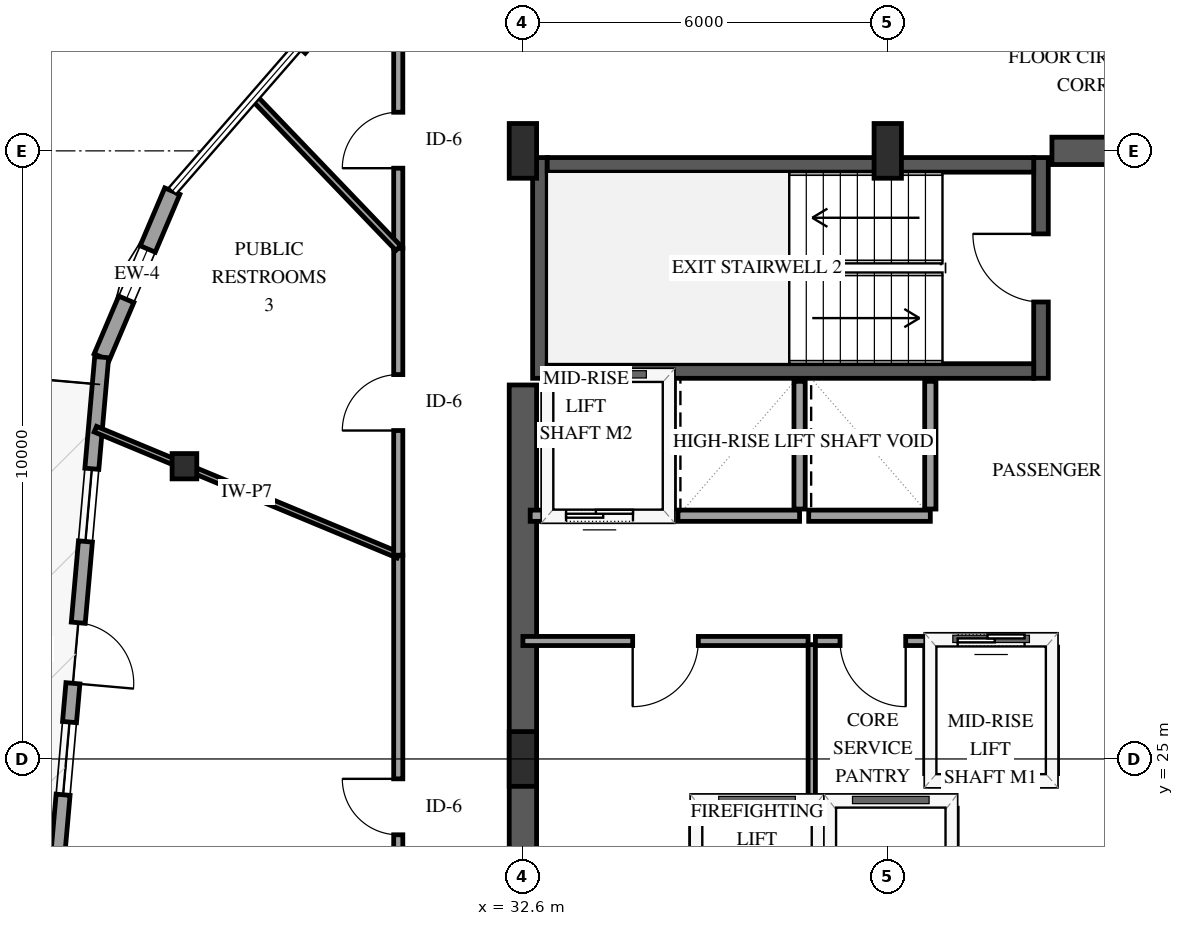
"""IFC4 building model, lengths in metres.
Left out: names, types, materials, properties, quantities, classifications, styles, units other than length and angle.
Written with IfcOpenShell. Run it as: python <this file> out.ifc"""

import sys

from ifc_helpers import new_model, si_unit, direction, frame, frame_2d, origin, origin_2d, place, context, subcontext, project, spatial, rectangle, i_section, extrude, element, fill, save


model = new_model("IFC4")
c1 = context("Model", 3, precision=1e-05, world=origin(), true_north=direction((0.0, 1.0)))
c2 = subcontext(c1, "Body", "Model", "MODEL_VIEW")
j1 = project(units=[si_unit("LENGTHUNIT", "METRE"), si_unit("PLANEANGLEUNIT", "RADIAN")], contexts=[c1])
p1 = place(None, origin())
s1 = spatial("IfcSite", under=j1, at=p1, CompositionType="ELEMENT")
p2 = place(p1, origin())
s2 = spatial("IfcBuilding", under=s1, at=p2, CompositionType="ELEMENT")
p3 = place(p2, frame((0.0, 0.0, 212.2)))
s3 = spatial("IfcBuildingStorey", under=s2, at=p3, CompositionType="ELEMENT", Elevation=212.2)
p4 = place(p3, frame((32.88, 31.26, 0.0), z_axis=(0.0, 0.0, 1.0), x_axis=(0.0, 1.0, 0.0)))
e1 = element("IfcWall", 1, at=p4, inside=s3, PredefinedType="SHEAR", context=c2, shape_type="SweptSolid", body=[
    extrude(rectangle(XDim=3.63, YDim=0.24, at=frame_2d((1.815, 0.0))), origin(), (0.0, 0.0, 1.0), 3.6),
])
p5 = place(p3, frame((41.12, 31.26, 0.0), z_axis=(0.0, 0.0, 1.0), x_axis=(0.0, 1.0, 0.0)))
e2 = element("IfcWall", 2, at=p5, inside=s3, PredefinedType="SHEAR", context=c2, shape_type="SweptSolid", body=[
    extrude(rectangle(XDim=3.63, YDim=0.24, at=frame_2d((1.815, 0.0))), origin(), (0.0, 0.0, 1.0), 3.6),
])
p6 = place(p5, frame((1.255, 0.0, 0.0)))
e3 = element("IfcOpeningElement", 3, at=p6, cuts=e2, PredefinedType="OPENING", context=c2, shape_type="SweptSolid", body=[
    extrude(rectangle(XDim=1.12, YDim=2.15, at=frame_2d((0.56, 1.075))), frame((0.0, 0.13, 0.0), z_axis=(0.0, -1.0, 0.0), x_axis=(1.0, 0.0, 0.0)), (0.0, 0.0, 1.0), 0.26),
])
for number, where, z_axis, x_axis in (
    (4, (33.0, 31.38, 0.0), (0.0, 0.0, 1.0), (1.0, 0.0, 0.0)),
    (5, (33.0, 34.77, 0.0), (0.0, 0.0, 1.0), (1.0, 0.0, 0.0)),
):
    element("IfcWall", number, at=place(p3, frame(where, z_axis=z_axis, x_axis=x_axis)), inside=s3, PredefinedType="SHEAR", context=c2, shape_type="SweptSolid", body=[
        extrude(rectangle(XDim=8.0, YDim=0.24, at=frame_2d((4.0, 0.0))), origin(), (0.0, 0.0, 1.0), 3.6),
    ])
p7 = place(p3, frame((32.6, 18.85, 0.0), z_axis=(0.0, 0.0, 1.0), x_axis=(0.0, 1.0, 0.0)))
e6 = element("IfcWall", 6, at=p7, inside=s3, PredefinedType="SHEAR", context=c2, shape_type="SweptSolid", body=[
    extrude(rectangle(XDim=12.3, YDim=0.45, at=frame_2d((6.15, 0.0))), origin(), (0.0, 0.0, 1.0), 3.6),
])
p8 = place(p3, frame((41.3, 35.0, 0.0), z_axis=(0.0, 0.0, 1.0), x_axis=(1.0, 0.0, 0.0)))
e7 = element("IfcWall", 7, at=p8, inside=s3, PredefinedType="SHEAR", context=c2, shape_type="SweptSolid", body=[
    extrude(rectangle(XDim=2.85, YDim=0.45, at=frame_2d((1.425, 0.0))), origin(), (0.0, 0.0, 1.0), 3.6),
])
for number, where, z_axis, x_axis in (
    (8, (32.6, 25.0, 0.0), (0.0, 0.0, 1.0), (1.0, 0.0, 0.0)),
    (9, (32.6, 35.0, 0.0), (0.0, 0.0, 1.0), (1.0, 0.0, 0.0)),
    (10, (38.6, 35.0, 0.0), (0.0, 0.0, 1.0), (1.0, 0.0, 0.0)),
):
    element("IfcColumn", number, at=place(p3, frame(where, z_axis=z_axis, x_axis=x_axis)), inside=s3, PredefinedType="PILASTER", context=c2, shape_type="SweptSolid", body=[
        extrude(rectangle(XDim=0.45, YDim=0.9, at=origin_2d()), origin(), (0.0, 0.0, 1.0), 3.6),
    ])
p9 = place(p3, frame((27.034, 29.814, 0.0), z_axis=(0.0, 0.0, 1.0), x_axis=(1.0, 0.0, 0.0)))
e11 = element("IfcColumn", 11, at=p9, inside=s3, PredefinedType="COLUMN", context=c2, shape_type="SweptSolid", body=[
    extrude(i_section(OverallWidth=0.406, OverallDepth=0.416, WebThickness=0.03, FlangeThickness=0.048, FilletRadius=0.038, at=origin_2d()), origin(), (0.0, 0.0, 1.0), 3.6),
])
p10 = place(p3, frame((26.834, 34.338, 0.0), z_axis=(0.0, 0.0, 1.0), x_axis=(-0.391325355633, -0.920252392574, 0.0)))
e12 = element("IfcWall", 12, at=p10, inside=s3, PredefinedType="SOLIDWALL", context=c2, shape_type="SweptSolid", body=[
    extrude(rectangle(XDim=2.967, YDim=0.27, at=frame_2d((1.483, 0.0))), origin(), (0.0, 0.0, 1.0), 2.679),
])
p11 = place(p10, frame((1.033, 0.0, 0.75)))
e13 = element("IfcOpeningElement", 13, at=p11, cuts=e12, PredefinedType="OPENING", context=c2, shape_type="SweptSolid", body=[
    extrude(rectangle(XDim=0.9, YDim=1.5, at=frame_2d((0.45, 0.75))), frame((0.0, 0.145, 0.0), z_axis=(0.0, -1.0, 0.0), x_axis=(1.0, 0.0, 0.0)), (0.0, 0.0, 1.0), 0.29),
])
p12 = place(p3, frame((25.673, 31.608, 0.0), z_axis=(0.0, 0.0, 1.0), x_axis=(-0.087869741306, -0.996131973467, 0.0)))
e14 = element("IfcWall", 14, at=p12, inside=s3, PredefinedType="SOLIDWALL", context=c2, shape_type="SweptSolid", body=[
    extrude(rectangle(XDim=9.769, YDim=0.23, at=frame_2d((4.885, 0.0))), origin(), (0.0, 0.0, 1.0), 2.679),
])
p13 = place(p12, frame((4.385, 0.0, 0.0)))
e15 = element("IfcOpeningElement", 15, at=p13, cuts=e14, PredefinedType="OPENING", context=c2, shape_type="SweptSolid", body=[
    extrude(rectangle(XDim=1.0, YDim=2.15, at=frame_2d((0.5, 1.075))), frame((0.0, 0.125, 0.0), z_axis=(0.0, -1.0, 0.0), x_axis=(1.0, 0.0, 0.0)), (0.0, 0.0, 1.0), 0.25),
])
p14 = place(p12, frame((1.843, 0.0, 0.72)))
e16 = element("IfcOpeningElement", 16, at=p14, cuts=e14, PredefinedType="OPENING", context=c2, shape_type="SweptSolid", body=[
    extrude(rectangle(XDim=1.2, YDim=1.6, at=frame_2d((0.6, 0.8))), frame((0.0, 0.125, 0.0), z_axis=(0.0, -1.0, 0.0), x_axis=(1.0, 0.0, 0.0)), (0.0, 0.0, 1.0), 0.25),
])
p15 = place(p12, frame((6.024, 0.0, 0.72)))
e17 = element("IfcOpeningElement", 17, at=p15, cuts=e14, PredefinedType="OPENING", context=c2, shape_type="SweptSolid", body=[
    extrude(rectangle(XDim=1.2, YDim=1.6, at=frame_2d((0.6, 0.8))), frame((0.0, 0.125, 0.0), z_axis=(0.0, -1.0, 0.0), x_axis=(1.0, 0.0, 0.0)), (0.0, 0.0, 1.0), 0.25),
])
p16 = place(p3, frame((35.45, 24.3, 0.0), z_axis=(0.0, 0.0, 1.0), x_axis=(1.0, 0.0, 0.0)))
e18 = element("IfcWall", 18, at=p16, inside=s3, PredefinedType="SOLIDWALL", context=c2, shape_type="SweptSolid", body=[
    extrude(rectangle(XDim=2.0, YDim=0.185, at=frame_2d((1.0, 0.0))), origin(), (0.0, 0.0, 1.0), 3.3),
])
for number, where, z_axis, x_axis in (
    (19, (35.45, 21.81, 0.0), (0.0, 0.0, 1.0), (0.0, 1.0, 0.0)),
    (20, (37.45, 21.81, 0.0), (0.0, 0.0, 1.0), (0.0, 1.0, 0.0)),
):
    element("IfcWall", number, at=place(p3, frame(where, z_axis=z_axis, x_axis=x_axis)), inside=s3, PredefinedType="SOLIDWALL", context=c2, shape_type="SweptSolid", body=[
        extrude(rectangle(XDim=2.38, YDim=0.185, at=frame_2d((1.19, 0.0))), origin(), (0.0, 0.0, 1.0), 3.3),
    ])
p17 = place(p3, frame((37.65, 24.3, 0.0), z_axis=(0.0, 0.0, 1.0), x_axis=(1.0, 0.0, 0.0)))
e21 = element("IfcWall", 21, at=p17, inside=s3, PredefinedType="SOLIDWALL", context=c2, shape_type="SweptSolid", body=[
    extrude(rectangle(XDim=2.0, YDim=0.185, at=frame_2d((1.0, 0.0))), origin(), (0.0, 0.0, 1.0), 3.3),
])
p18 = place(p3, frame((39.65, 21.81, 0.0), z_axis=(0.0, 0.0, 1.0), x_axis=(0.0, 1.0, 0.0)))
e22 = element("IfcWall", 22, at=p18, inside=s3, PredefinedType="SOLIDWALL", context=c2, shape_type="SweptSolid", body=[
    extrude(rectangle(XDim=2.38, YDim=0.185, at=frame_2d((1.19, 0.0))), origin(), (0.0, 0.0, 1.0), 3.3),
])
p19 = place(p3, frame((39.3, 24.65, 0.0), z_axis=(0.0, 0.0, 1.0), x_axis=(1.0, 0.0, 0.0)))
e23 = element("IfcWall", 23, at=p19, inside=s3, PredefinedType="SOLIDWALL", context=c2, shape_type="SweptSolid", body=[
    extrude(rectangle(XDim=2.0, YDim=0.185, at=frame_2d((1.0, 0.0))), origin(), (0.0, 0.0, 1.0), 3.3),
])
p20 = place(p3, frame((39.3, 26.95, 0.0), z_axis=(0.0, 0.0, 1.0), x_axis=(1.0, 0.0, 0.0)))
e24 = element("IfcWall", 24, at=p20, inside=s3, PredefinedType="SOLIDWALL", context=c2, shape_type="SweptSolid", body=[
    extrude(rectangle(XDim=2.0, YDim=0.185, at=frame_2d((1.0, 0.0))), origin(), (0.0, 0.0, 1.0), 3.3),
])
p21 = place(p20, frame((0.45, 0.0, 0.0)))
e25 = element("IfcOpeningElement", 25, at=p21, cuts=e24, PredefinedType="OPENING", context=c2, shape_type="SweptSolid", body=[
    extrude(rectangle(XDim=1.1, YDim=2.15, at=frame_2d((0.55, 1.075))), frame((0.0, 0.103, 0.0), z_axis=(0.0, -1.0, 0.0), x_axis=(1.0, 0.0, 0.0)), (0.0, 0.0, 1.0), 0.205),
])
for number, where, z_axis, x_axis in (
    (26, (39.3, 24.76, 0.0), (0.0, 0.0, 1.0), (0.0, 1.0, 0.0)),
    (27, (41.3, 24.76, 0.0), (0.0, 0.0, 1.0), (0.0, 1.0, 0.0)),
):
    element("IfcWall", number, at=place(p3, frame(where, z_axis=z_axis, x_axis=x_axis)), inside=s3, PredefinedType="SOLIDWALL", context=c2, shape_type="SweptSolid", body=[
        extrude(rectangle(XDim=2.08, YDim=0.185, at=frame_2d((1.04, 0.0))), origin(), (0.0, 0.0, 1.0), 3.3),
    ])
p22 = place(p3, frame((32.72, 29.0, 0.0), z_axis=(0.0, 0.0, 1.0), x_axis=(1.0, 0.0, 0.0)))
e28 = element("IfcWall", 28, at=p22, inside=s3, PredefinedType="SOLIDWALL", context=c2, shape_type="SweptSolid", body=[
    extrude(rectangle(XDim=2.28, YDim=0.185, at=frame_2d((1.14, 0.0))), origin(), (0.0, 0.0, 1.0), 3.3),
])
p23 = place(p22, frame((0.59, 0.0, 0.0)))
e29 = element("IfcOpeningElement", 29, at=p23, cuts=e28, PredefinedType="OPENING", context=c2, shape_type="SweptSolid", body=[
    extrude(rectangle(XDim=1.1, YDim=2.15, at=frame_2d((0.55, 1.075))), frame((0.0, 0.103, 0.0), z_axis=(0.0, -1.0, 0.0), x_axis=(1.0, 0.0, 0.0)), (0.0, 0.0, 1.0), 0.205),
])
p24 = place(p3, frame((35.0, 29.11, 0.0), z_axis=(0.0, 0.0, 1.0), x_axis=(0.0, 1.0, 0.0)))
e30 = element("IfcWall", 30, at=p24, inside=s3, PredefinedType="SOLIDWALL", context=c2, shape_type="SweptSolid", body=[
    extrude(rectangle(XDim=2.1, YDim=0.185, at=frame_2d((1.05, 0.0))), origin(), (0.0, 0.0, 1.0), 3.3),
])
p25 = place(p3, frame((35.15, 29.0, 0.0), z_axis=(0.0, 0.0, 1.0), x_axis=(1.0, 0.0, 0.0)))
e31 = element("IfcWall", 31, at=p25, inside=s3, PredefinedType="SOLIDWALL", context=c2, shape_type="SweptSolid", body=[
    extrude(rectangle(XDim=2.0, YDim=0.185, at=frame_2d((1.0, 0.0))), origin(), (0.0, 0.0, 1.0), 3.3),
])
p26 = place(p3, frame((37.15, 29.11, 0.0), z_axis=(0.0, 0.0, 1.0), x_axis=(0.0, 1.0, 0.0)))
e32 = element("IfcWall", 32, at=p26, inside=s3, PredefinedType="SOLIDWALL", context=c2, shape_type="SweptSolid", body=[
    extrude(rectangle(XDim=2.1, YDim=0.185, at=frame_2d((1.05, 0.0))), origin(), (0.0, 0.0, 1.0), 3.3),
])
p27 = place(p3, frame((37.3, 29.0, 0.0), z_axis=(0.0, 0.0, 1.0), x_axis=(1.0, 0.0, 0.0)))
e33 = element("IfcWall", 33, at=p27, inside=s3, PredefinedType="SOLIDWALL", context=c2, shape_type="SweptSolid", body=[
    extrude(rectangle(XDim=2.0, YDim=0.185, at=frame_2d((1.0, 0.0))), origin(), (0.0, 0.0, 1.0), 3.3),
])
p28 = place(p3, frame((39.3, 29.11, 0.0), z_axis=(0.0, 0.0, 1.0), x_axis=(0.0, 1.0, 0.0)))
e34 = element("IfcWall", 34, at=p28, inside=s3, PredefinedType="SOLIDWALL", context=c2, shape_type="SweptSolid", body=[
    extrude(rectangle(XDim=2.1, YDim=0.185, at=frame_2d((1.05, 0.0))), origin(), (0.0, 0.0, 1.0), 3.3),
])
p29 = place(p3, frame((30.55, 20.106, 0.0), z_axis=(0.0, 0.0, 1.0), x_axis=(0.0, 1.0, 0.0)))
e35 = element("IfcWall", 35, at=p29, inside=s3, PredefinedType="PARTITIONING", context=c2, shape_type="SweptSolid", body=[
    extrude(rectangle(XDim=8.245, YDim=0.15, at=frame_2d((4.123, 0.0))), origin(), (0.0, 0.0, 1.0), 3.3),
])
p30 = place(p29, frame((3.647, 0.0, 0.0)))
e36 = element("IfcOpeningElement", 36, at=p30, cuts=e35, PredefinedType="OPENING", context=c2, shape_type="SweptSolid", body=[
    extrude(rectangle(XDim=0.92, YDim=2.12, at=frame_2d((0.46, 1.06))), frame((0.0, 0.085, 0.0), z_axis=(0.0, -1.0, 0.0), x_axis=(1.0, 0.0, 0.0)), (0.0, 0.0, 1.0), 0.17),
])
p31 = place(p3, frame((30.55, 28.351, 0.0), z_axis=(0.0, 0.0, 1.0), x_axis=(-0.923299028804, 0.384081896748, 0.0)))
e37 = element("IfcWall", 37, at=p31, inside=s3, PredefinedType="PARTITIONING", context=c2, shape_type="SweptSolid", body=[
    extrude(rectangle(XDim=5.395, YDim=0.1, at=frame_2d((2.697, 0.0))), origin(), (0.0, 0.0, 1.0), 3.3),
])
p32 = place(p3, frame((30.55, 28.351, 0.0), z_axis=(0.0, 0.0, 1.0), x_axis=(0.0, 1.0, 0.0)))
e38 = element("IfcWall", 38, at=p32, inside=s3, PredefinedType="PARTITIONING", context=c2, shape_type="SweptSolid", body=[
    extrude(rectangle(XDim=5.05, YDim=0.15, at=frame_2d((2.525, 0.0))), origin(), (0.0, 0.0, 1.0), 3.3),
])
p33 = place(p32, frame((2.05, 0.0, 0.0)))
e39 = element("IfcOpeningElement", 39, at=p33, cuts=e38, PredefinedType="OPENING", context=c2, shape_type="SweptSolid", body=[
    extrude(rectangle(XDim=0.92, YDim=2.12, at=frame_2d((0.46, 1.06))), frame((0.0, 0.085, 0.0), z_axis=(0.0, -1.0, 0.0), x_axis=(1.0, 0.0, 0.0)), (0.0, 0.0, 1.0), 0.17),
])
p34 = place(p3, frame((37.29, 26.94, 0.0), z_axis=(0.0, 0.0, 1.0), x_axis=(-1.0, 0.0, 0.0)))
e40 = element("IfcWall", 40, at=p34, inside=s3, PredefinedType="PARTITIONING", context=c2, shape_type="SweptSolid", body=[
    extrude(rectangle(XDim=4.69, YDim=0.15, at=frame_2d((2.345, 0.0))), origin(), (0.0, 0.0, 1.0), 3.3),
])
p35 = place(p34, frame((1.805, 0.0, 0.0)))
e41 = element("IfcOpeningElement", 41, at=p35, cuts=e40, PredefinedType="OPENING", context=c2, shape_type="SweptSolid", body=[
    extrude(rectangle(XDim=1.08, YDim=2.15, at=frame_2d((0.54, 1.075))), frame((0.0, 0.085, 0.0), z_axis=(0.0, -1.0, 0.0), x_axis=(1.0, 0.0, 0.0)), (0.0, 0.0, 1.0), 0.17),
])
p36 = place(p3, frame((30.55, 33.401, 0.0), z_axis=(0.0, 0.0, 1.0), x_axis=(0.0, 1.0, 0.0)))
e42 = element("IfcWall", 42, at=p36, inside=s3, PredefinedType="PARTITIONING", context=c2, shape_type="SweptSolid", body=[
    extrude(rectangle(XDim=3.579, YDim=0.15, at=frame_2d((1.79, 0.0))), origin(), (0.0, 0.0, 1.0), 3.3),
])
p37 = place(p36, frame((1.314, 0.0, 0.0)))
e43 = element("IfcOpeningElement", 43, at=p37, cuts=e42, PredefinedType="OPENING", context=c2, shape_type="SweptSolid", body=[
    extrude(rectangle(XDim=0.92, YDim=2.12, at=frame_2d((0.46, 1.06))), frame((0.0, 0.085, 0.0), z_axis=(0.0, -1.0, 0.0), x_axis=(1.0, 0.0, 0.0)), (0.0, 0.0, 1.0), 0.17),
])
p38 = place(p3, frame((30.55, 33.401, 0.0), z_axis=(0.0, 0.0, 1.0), x_axis=(-0.691939349726, 0.721955633194, 0.0)))
e44 = element("IfcWall", 44, at=p38, inside=s3, PredefinedType="PARTITIONING", context=c2, shape_type="SweptSolid", body=[
    extrude(rectangle(XDim=3.432, YDim=0.11, at=frame_2d((1.716, 0.0))), origin(), (0.0, 0.0, 1.0), 3.3),
])
p39 = place(p3, frame((37.35, 26.88, 0.0), z_axis=(0.0, 0.0, 1.0), x_axis=(0.0, -1.0, 0.0)))
e45 = element("IfcWall", 45, at=p39, inside=s3, PredefinedType="PARTITIONING", context=c2, shape_type="SweptSolid", body=[
    extrude(rectangle(XDim=2.58, YDim=0.12, at=frame_2d((1.29, 0.0))), origin(), (0.0, 0.0, 1.0), 3.3),
])
p40 = place(p3, frame((39.3, 26.94, 0.0), z_axis=(0.0, 0.0, 1.0), x_axis=(-1.0, 0.0, 0.0)))
e46 = element("IfcWall", 46, at=p40, inside=s3, PredefinedType="PARTITIONING", context=c2, shape_type="SweptSolid", body=[
    extrude(rectangle(XDim=1.89, YDim=0.15, at=frame_2d((0.945, 0.0))), origin(), (0.0, 0.0, 1.0), 3.3),
])
p41 = place(p40, frame((0.405, 0.0, 0.0)))
e47 = element("IfcOpeningElement", 47, at=p41, cuts=e46, PredefinedType="OPENING", context=c2, shape_type="SweptSolid", body=[
    extrude(rectangle(XDim=1.08, YDim=2.15, at=frame_2d((0.54, 1.075))), frame((0.0, 0.085, 0.0), z_axis=(0.0, -1.0, 0.0), x_axis=(1.0, 0.0, 0.0)), (0.0, 0.0, 1.0), 0.17),
])
p42 = place(p11, origin())
e48 = element("IfcWindow", 48, at=p42, inside=s3, PartitioningType="SINGLE_PANEL", PredefinedType="WINDOW", context=c2, shape_type="SweptSolid", body=[
    extrude(rectangle(XDim=0.9, YDim=1.5, at=frame_2d((0.45, 0.75))), frame((0.0, 0.03, 0.0), z_axis=(0.0, -1.0, 0.0), x_axis=(1.0, 0.0, 0.0)), (0.0, 0.0, 1.0), 0.06),
])
fill(e13, e48)
p43 = place(p13, origin())
e49 = element("IfcDoor", 49, at=p43, inside=s3, OperationType="SINGLE_SWING_RIGHT", PredefinedType="DOOR", context=c2, shape_type="SweptSolid", body=[
    extrude(rectangle(XDim=1.0, YDim=2.15, at=frame_2d((0.5, 1.075))), frame((0.0, 0.025, 0.0), z_axis=(0.0, -1.0, 0.0), x_axis=(1.0, 0.0, 0.0)), (0.0, 0.0, 1.0), 0.05),
])
fill(e15, e49)
p44 = place(p14, origin())
e50 = element("IfcWindow", 50, at=p44, inside=s3, PartitioningType="SINGLE_PANEL", PredefinedType="WINDOW", context=c2, shape_type="SweptSolid", body=[
    extrude(rectangle(XDim=1.2, YDim=1.6, at=frame_2d((0.6, 0.8))), frame((0.0, 0.03, 0.0), z_axis=(0.0, -1.0, 0.0), x_axis=(1.0, 0.0, 0.0)), (0.0, 0.0, 1.0), 0.06),
])
fill(e16, e50)
p45 = place(p15, origin())
e51 = element("IfcWindow", 51, at=p45, inside=s3, PartitioningType="SINGLE_PANEL", PredefinedType="WINDOW", context=c2, shape_type="SweptSolid", body=[
    extrude(rectangle(XDim=1.2, YDim=1.6, at=frame_2d((0.6, 0.8))), frame((0.0, 0.03, 0.0), z_axis=(0.0, -1.0, 0.0), x_axis=(1.0, 0.0, 0.0)), (0.0, 0.0, 1.0), 0.06),
])
fill(e17, e51)
p46 = place(p21, origin())
e52 = element("IfcDoor", 52, at=p46, inside=s3, OperationType="SLIDING_TO_LEFT", PredefinedType="DOOR", context=c2, shape_type="SweptSolid", body=[
    extrude(rectangle(XDim=1.1, YDim=2.15, at=frame_2d((0.55, 1.075))), frame((0.0, 0.025, 0.0), z_axis=(0.0, -1.0, 0.0), x_axis=(1.0, 0.0, 0.0)), (0.0, 0.0, 1.0), 0.05),
])
fill(e25, e52)
p47 = place(p23, origin())
e53 = element("IfcDoor", 53, at=p47, inside=s3, OperationType="SLIDING_TO_LEFT", PredefinedType="DOOR", context=c2, shape_type="SweptSolid", body=[
    extrude(rectangle(XDim=1.1, YDim=2.15, at=frame_2d((0.55, 1.075))), frame((0.0, 0.025, 0.0), z_axis=(0.0, -1.0, 0.0), x_axis=(1.0, 0.0, 0.0)), (0.0, 0.0, 1.0), 0.05),
])
fill(e29, e53)
p48 = place(p6, origin())
e54 = element("IfcDoor", 54, at=p48, inside=s3, OperationType="SINGLE_SWING_RIGHT", PredefinedType="DOOR", context=c2, shape_type="SweptSolid", body=[
    extrude(rectangle(XDim=1.12, YDim=2.15, at=frame_2d((0.56, 1.075))), frame((0.0, 0.025, 0.0), z_axis=(0.0, -1.0, 0.0), x_axis=(1.0, 0.0, 0.0)), (0.0, 0.0, 1.0), 0.05),
])
fill(e3, e54)
p49 = place(p30, origin())
e55 = element("IfcDoor", 55, at=p49, inside=s3, OperationType="SINGLE_SWING_RIGHT", PredefinedType="DOOR", context=c2, shape_type="SweptSolid", body=[
    extrude(rectangle(XDim=0.92, YDim=2.12, at=frame_2d((0.46, 1.06))), frame((0.0, 0.025, 0.0), z_axis=(0.0, -1.0, 0.0), x_axis=(1.0, 0.0, 0.0)), (0.0, 0.0, 1.0), 0.05),
])
fill(e36, e55)
p50 = place(p33, origin())
e56 = element("IfcDoor", 56, at=p50, inside=s3, OperationType="SINGLE_SWING_LEFT", PredefinedType="DOOR", context=c2, shape_type="SweptSolid", body=[
    extrude(rectangle(XDim=0.92, YDim=2.12, at=frame_2d((0.46, 1.06))), frame((0.0, 0.025, 0.0), z_axis=(0.0, -1.0, 0.0), x_axis=(1.0, 0.0, 0.0)), (0.0, 0.0, 1.0), 0.05),
])
fill(e39, e56)
p51 = place(p35, origin())
e57 = element("IfcDoor", 57, at=p51, inside=s3, OperationType="SINGLE_SWING_RIGHT", PredefinedType="DOOR", context=c2, shape_type="SweptSolid", body=[
    extrude(rectangle(XDim=1.08, YDim=2.15, at=frame_2d((0.54, 1.075))), frame((0.0, 0.025, 0.0), z_axis=(0.0, -1.0, 0.0), x_axis=(1.0, 0.0, 0.0)), (0.0, 0.0, 1.0), 0.05),
])
fill(e41, e57)
p52 = place(p37, origin())
e58 = element("IfcDoor", 58, at=p52, inside=s3, OperationType="SINGLE_SWING_LEFT", PredefinedType="DOOR", context=c2, shape_type="SweptSolid", body=[
    extrude(rectangle(XDim=0.92, YDim=2.12, at=frame_2d((0.46, 1.06))), frame((0.0, 0.025, 0.0), z_axis=(0.0, -1.0, 0.0), x_axis=(1.0, 0.0, 0.0)), (0.0, 0.0, 1.0), 0.05),
])
fill(e43, e58)
p53 = place(p41, origin())
e59 = element("IfcDoor", 59, at=p53, inside=s3, OperationType="SINGLE_SWING_LEFT", PredefinedType="DOOR", context=c2, shape_type="SweptSolid", body=[
    extrude(rectangle(XDim=1.08, YDim=2.15, at=frame_2d((0.54, 1.075))), frame((0.0, 0.025, 0.0), z_axis=(0.0, -1.0, 0.0), x_axis=(1.0, 0.0, 0.0)), (0.0, 0.0, 1.0), 0.05),
])
fill(e47, e59)
save(model, sys.argv[1])
